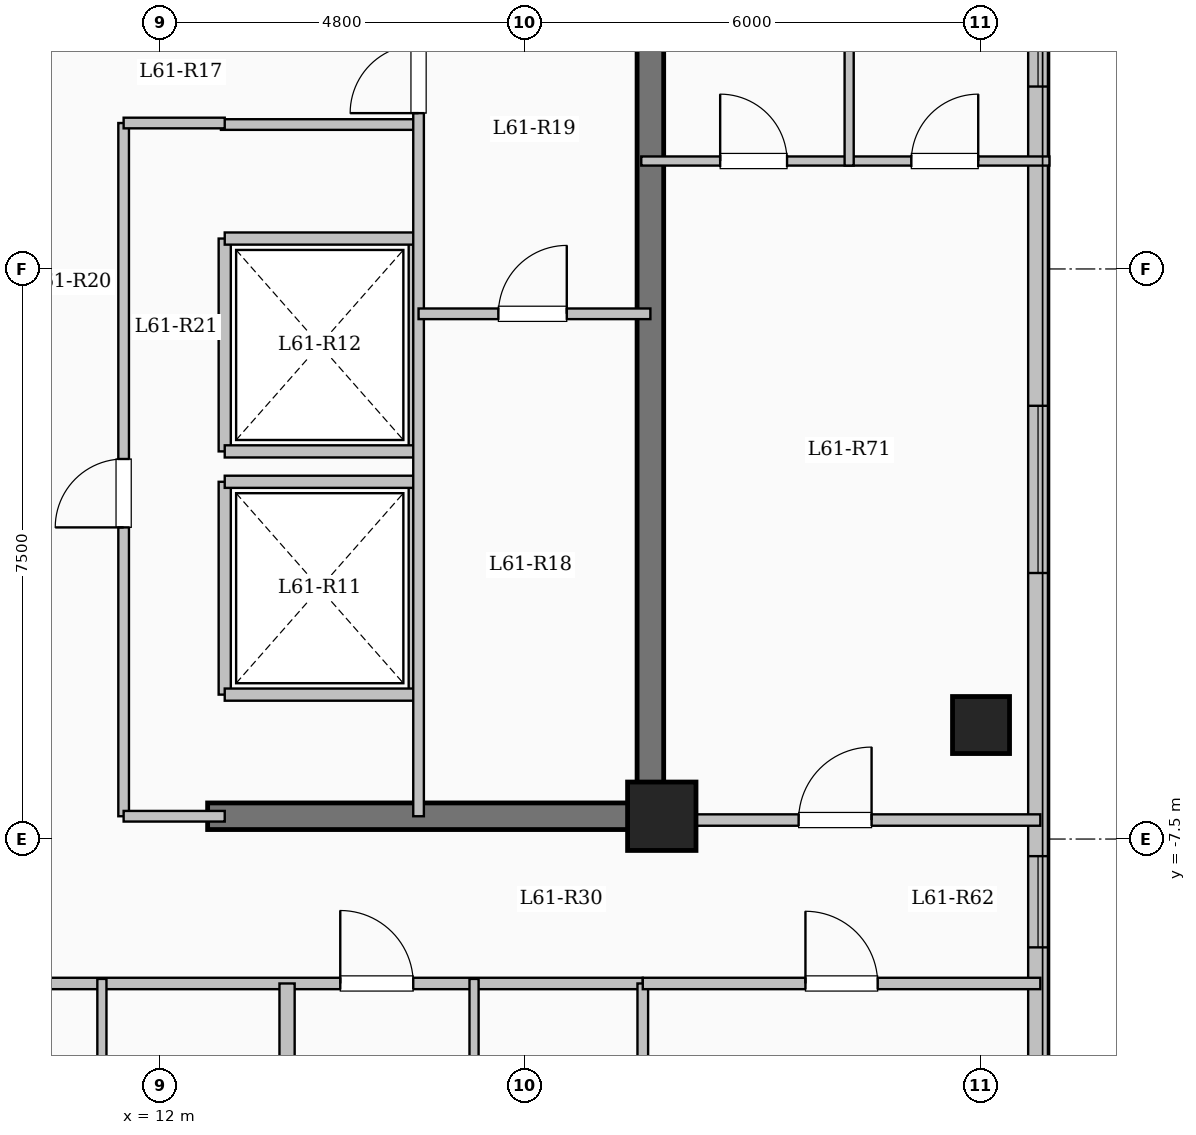
"""IFC4 building model, lengths in metres.
Left out: names, types, materials, properties, quantities, classifications, styles, units other than length and angle.
Written with IfcOpenShell. Run it as: python <this file> out.ifc"""

import sys

from ifc_helpers import new_model, si_unit, direction, frame, frame_2d, origin, origin_2d, place, context, subcontext, project, spatial, rectangle, extrude, element, fill, save


model = new_model("IFC4")
c1 = context("Model", 3, precision=1e-05, world=origin(), true_north=direction((0.0, 1.0)))
c2 = subcontext(c1, "Body", "Model", "MODEL_VIEW")
j1 = project(units=[si_unit("LENGTHUNIT", "METRE"), si_unit("PLANEANGLEUNIT", "RADIAN")], contexts=[c1])
p1 = place(None, origin())
s1 = spatial("IfcSite", under=j1, at=p1, CompositionType="ELEMENT")
p2 = place(p1, origin())
s2 = spatial("IfcBuilding", under=s1, at=p2, CompositionType="ELEMENT")
p3 = place(p2, frame((0.0, 0.0, 223.75)))
s3 = spatial("IfcBuildingStorey", under=s2, at=p3, CompositionType="ELEMENT", Elevation=223.75)
p4 = place(p3, frame((18.6, -7.2, 0.0), z_axis=(0.0, 0.0, 1.0), x_axis=(1.0, 0.0, 0.0)))
e1 = element("IfcColumn", 1, at=p4, inside=s3, PredefinedType="COLUMN", context=c2, shape_type="SweptSolid", body=[
    extrude(rectangle(XDim=0.9, YDim=0.9, at=origin_2d()), origin(), (0.0, 0.0, 1.0), 3.35),
])
p5 = place(p3, frame((22.8, -6.0, 0.0), z_axis=(0.0, 0.0, 1.0), x_axis=(1.0, 0.0, 0.0)))
e2 = element("IfcColumn", 2, at=p5, inside=s3, PredefinedType="COLUMN", context=c2, shape_type="SweptSolid", body=[
    extrude(rectangle(XDim=0.75, YDim=0.75, at=origin_2d()), origin(), (0.0, 0.0, 1.0), 3.35),
])
p6 = place(p3, frame((23.55, 17.25, 0.0), z_axis=(0.0, 0.0, 1.0), x_axis=(0.0, -1.0, 0.0)))
e3 = element("IfcWall", 3, at=p6, inside=s3, PredefinedType="SOLIDWALL", context=c2, shape_type="SweptSolid", body=[
    extrude(rectangle(XDim=34.5, YDim=0.26, at=frame_2d((17.25, 0.0))), origin(), (0.0, 0.0, 1.0), 3.05),
])
p7 = place(p6, frame((1.375, 0.0, 0.9)))
e4 = element("IfcOpeningElement", 4, at=p7, cuts=e3, PredefinedType="OPENING", context=c2, shape_type="SweptSolid", body=[
    extrude(rectangle(XDim=2.0, YDim=1.7, at=frame_2d((1.0, 0.85))), frame((0.0, 0.14, 0.0), z_axis=(0.0, -1.0, 0.0), x_axis=(1.0, 0.0, 0.0)), (0.0, 0.0, 1.0), 0.28),
])
p8 = place(p6, frame((5.125, 0.0, 0.95)))
e5 = element("IfcOpeningElement", 5, at=p8, cuts=e3, PredefinedType="OPENING", context=c2, shape_type="SweptSolid", body=[
    extrude(rectangle(XDim=1.0, YDim=1.5, at=frame_2d((0.5, 0.75))), frame((0.0, 0.14, 0.0), z_axis=(0.0, -1.0, 0.0), x_axis=(1.0, 0.0, 0.0)), (0.0, 0.0, 1.0), 0.28),
])
p9 = place(p6, frame((8.375, 0.0, 0.9)))
e6 = element("IfcOpeningElement", 6, at=p9, cuts=e3, PredefinedType="OPENING", context=c2, shape_type="SweptSolid", body=[
    extrude(rectangle(XDim=2.0, YDim=1.7, at=frame_2d((1.0, 0.85))), frame((0.0, 0.14, 0.0), z_axis=(0.0, -1.0, 0.0), x_axis=(1.0, 0.0, 0.0)), (0.0, 0.0, 1.0), 0.28),
])
p10 = place(p6, frame((13.2, 0.0, 0.9)))
e7 = element("IfcOpeningElement", 7, at=p10, cuts=e3, PredefinedType="OPENING", context=c2, shape_type="SweptSolid", body=[
    extrude(rectangle(XDim=1.65, YDim=1.6, at=frame_2d((0.825, 0.8))), frame((0.0, 0.14, 0.0), z_axis=(0.0, -1.0, 0.0), x_axis=(1.0, 0.0, 0.0)), (0.0, 0.0, 1.0), 0.28),
])
p11 = place(p6, frame((19.05, 0.0, 0.9)))
e8 = element("IfcOpeningElement", 8, at=p11, cuts=e3, PredefinedType="OPENING", context=c2, shape_type="SweptSolid", body=[
    extrude(rectangle(XDim=2.2, YDim=1.75, at=frame_2d((1.1, 0.875))), frame((0.0, 0.14, 0.0), z_axis=(0.0, -1.0, 0.0), x_axis=(1.0, 0.0, 0.0)), (0.0, 0.0, 1.0), 0.28),
])
p12 = place(p6, frame((24.975, 0.0, 0.95)))
e9 = element("IfcOpeningElement", 9, at=p12, cuts=e3, PredefinedType="OPENING", context=c2, shape_type="SweptSolid", body=[
    extrude(rectangle(XDim=1.2, YDim=1.5, at=frame_2d((0.6, 0.75))), frame((0.0, 0.14, 0.0), z_axis=(0.0, -1.0, 0.0), x_axis=(1.0, 0.0, 0.0)), (0.0, 0.0, 1.0), 0.28),
])
p13 = place(p6, frame((29.475, 0.0, 0.9)))
e10 = element("IfcOpeningElement", 10, at=p13, cuts=e3, PredefinedType="OPENING", context=c2, shape_type="SweptSolid", body=[
    extrude(rectangle(XDim=2.2, YDim=1.75, at=frame_2d((1.1, 0.875))), frame((0.0, 0.14, 0.0), z_axis=(0.0, -1.0, 0.0), x_axis=(1.0, 0.0, 0.0)), (0.0, 0.0, 1.0), 0.28),
])
for number, where, z_axis, x_axis in (
    (11, (12.85, -5.6, 0.0), (0.0, 0.0, 1.0), (0.0, 1.0, 0.0)),
    (12, (15.35, -5.6, 0.0), (0.0, 0.0, 1.0), (0.0, 1.0, 0.0)),
):
    element("IfcWall", number, at=place(p3, frame(where, z_axis=z_axis, x_axis=x_axis)), inside=s3, PredefinedType="SOLIDWALL", context=c2, shape_type="SweptSolid", body=[
        extrude(rectangle(XDim=2.8, YDim=0.16, at=frame_2d((1.4, 0.0))), origin(), (0.0, 0.0, 1.0), 3.05),
    ])
for number, where, z_axis, x_axis in (
    (13, (12.85, -5.6, 0.0), (0.0, 0.0, 1.0), (1.0, 0.0, 0.0)),
    (14, (12.85, -2.8, 0.0), (0.0, 0.0, 1.0), (1.0, 0.0, 0.0)),
):
    element("IfcWall", number, at=place(p3, frame(where, z_axis=z_axis, x_axis=x_axis)), inside=s3, PredefinedType="SOLIDWALL", context=c2, shape_type="SweptSolid", body=[
        extrude(rectangle(XDim=2.5, YDim=0.16, at=frame_2d((1.25, 0.0))), origin(), (0.0, 0.0, 1.0), 3.05),
    ])
for number, where, z_axis, x_axis in (
    (15, (12.85, -2.4, 0.0), (0.0, 0.0, 1.0), (0.0, 1.0, 0.0)),
    (16, (15.35, -2.4, 0.0), (0.0, 0.0, 1.0), (0.0, 1.0, 0.0)),
):
    element("IfcWall", number, at=place(p3, frame(where, z_axis=z_axis, x_axis=x_axis)), inside=s3, PredefinedType="SOLIDWALL", context=c2, shape_type="SweptSolid", body=[
        extrude(rectangle(XDim=2.8, YDim=0.16, at=frame_2d((1.4, 0.0))), origin(), (0.0, 0.0, 1.0), 3.05),
    ])
for number, where, z_axis, x_axis in (
    (17, (12.85, -2.4, 0.0), (0.0, 0.0, 1.0), (1.0, 0.0, 0.0)),
    (18, (12.85, 0.4, 0.0), (0.0, 0.0, 1.0), (1.0, 0.0, 0.0)),
):
    element("IfcWall", number, at=place(p3, frame(where, z_axis=z_axis, x_axis=x_axis)), inside=s3, PredefinedType="SOLIDWALL", context=c2, shape_type="SweptSolid", body=[
        extrude(rectangle(XDim=2.5, YDim=0.16, at=frame_2d((1.25, 0.0))), origin(), (0.0, 0.0, 1.0), 3.05),
    ])
p14 = place(p3, frame((18.45, -7.375, 0.0), z_axis=(0.0, 0.0, 1.0), x_axis=(0.0, 1.0, 0.0)))
e19 = element("IfcWall", 19, at=p14, inside=s3, PredefinedType="SHEAR", context=c2, shape_type="SweptSolid", body=[
    extrude(rectangle(XDim=14.05, YDim=0.35, at=frame_2d((7.025, 0.0))), origin(), (0.0, 0.0, 1.0), 3.35),
])
p15 = place(p3, frame((12.625, -7.2, 0.0), z_axis=(0.0, 0.0, 1.0), x_axis=(1.0, 0.0, 0.0)))
e20 = element("IfcWall", 20, at=p15, inside=s3, PredefinedType="SHEAR", context=c2, shape_type="SweptSolid", body=[
    extrude(rectangle(XDim=6.0, YDim=0.35, at=frame_2d((3.0, 0.0))), origin(), (0.0, 0.0, 1.0), 3.35),
])
p16 = place(p3, frame((12.8, 1.9, 0.0), z_axis=(0.0, 0.0, 1.0), x_axis=(1.0, 0.0, 0.0)))
e21 = element("IfcWall", 21, at=p16, inside=s3, PredefinedType="PARTITIONING", context=c2, shape_type="SweptSolid", body=[
    extrude(rectangle(XDim=2.6, YDim=0.14, at=frame_2d((1.3, 0.0))), origin(), (0.0, 0.0, 1.0), 3.05),
])
p17 = place(p3, frame((15.4, -7.2, 0.0), z_axis=(0.0, 0.0, 1.0), x_axis=(0.0, 1.0, 0.0)))
e22 = element("IfcWall", 22, at=p17, inside=s3, PredefinedType="PARTITIONING", context=c2, shape_type="SweptSolid", body=[
    extrude(rectangle(XDim=10.45, YDim=0.14, at=frame_2d((5.225, 0.0))), origin(), (0.0, 0.0, 1.0), 3.05),
])
p18 = place(p17, frame((9.25, 0.0, 0.0)))
e23 = element("IfcOpeningElement", 23, at=p18, cuts=e22, PredefinedType="OPENING", context=c2, shape_type="SweptSolid", body=[
    extrude(rectangle(XDim=0.9, YDim=2.08, at=frame_2d((0.45, 1.04))), frame((0.0, 0.08, 0.0), z_axis=(0.0, -1.0, 0.0), x_axis=(1.0, 0.0, 0.0)), (0.0, 0.0, 1.0), 0.16),
])
p19 = place(p3, frame((15.4, -0.59, 0.0), z_axis=(0.0, 0.0, 1.0), x_axis=(1.0, 0.0, 0.0)))
e24 = element("IfcWall", 24, at=p19, inside=s3, PredefinedType="PARTITIONING", context=c2, shape_type="SweptSolid", body=[
    extrude(rectangle(XDim=3.05, YDim=0.14, at=frame_2d((1.525, 0.0))), origin(), (0.0, 0.0, 1.0), 3.05),
])
p20 = place(p19, frame((1.05, 0.0, 0.0)))
e25 = element("IfcOpeningElement", 25, at=p20, cuts=e24, PredefinedType="OPENING", context=c2, shape_type="SweptSolid", body=[
    extrude(rectangle(XDim=0.9, YDim=2.08, at=frame_2d((0.45, 1.04))), frame((0.0, 0.08, 0.0), z_axis=(0.0, -1.0, 0.0), x_axis=(1.0, 0.0, 0.0)), (0.0, 0.0, 1.0), 0.16),
])
p21 = place(p3, frame((11.52, -7.2, 0.0), z_axis=(0.0, 0.0, 1.0), x_axis=(0.0, 1.0, 0.0)))
e26 = element("IfcWall", 26, at=p21, inside=s3, PredefinedType="PARTITIONING", context=c2, shape_type="SweptSolid", body=[
    extrude(rectangle(XDim=9.12, YDim=0.14, at=frame_2d((4.56, 0.0))), origin(), (0.0, 0.0, 1.0), 3.05),
])
p22 = place(p21, frame((3.8, 0.0, 0.0)))
e27 = element("IfcOpeningElement", 27, at=p22, cuts=e26, PredefinedType="OPENING", context=c2, shape_type="SweptSolid", body=[
    extrude(rectangle(XDim=0.9, YDim=2.08, at=frame_2d((0.45, 1.04))), frame((0.0, 0.08, 0.0), z_axis=(0.0, -1.0, 0.0), x_axis=(1.0, 0.0, 0.0)), (0.0, 0.0, 1.0), 0.16),
])
p23 = place(p3, frame((11.52, 1.92, 0.0), z_axis=(0.0, 0.0, 1.0), x_axis=(1.0, 0.0, 0.0)))
e28 = element("IfcWall", 28, at=p23, inside=s3, PredefinedType="PARTITIONING", context=c2, shape_type="SweptSolid", body=[
    extrude(rectangle(XDim=1.33, YDim=0.14, at=frame_2d((0.665, 0.0))), origin(), (0.0, 0.0, 1.0), 3.05),
])
p24 = place(p3, frame((11.52, -7.2, 0.0), z_axis=(0.0, 0.0, 1.0), x_axis=(1.0, 0.0, 0.0)))
e29 = element("IfcWall", 29, at=p24, inside=s3, PredefinedType="PARTITIONING", context=c2, shape_type="SweptSolid", body=[
    extrude(rectangle(XDim=1.33, YDim=0.14, at=frame_2d((0.665, 0.0))), origin(), (0.0, 0.0, 1.0), 2.22),
])
p25 = place(p3, frame((8.55, -9.4, 0.0), z_axis=(0.0, 0.0, 1.0), x_axis=(1.0, 0.0, 0.0)))
e30 = element("IfcWall", 30, at=p25, inside=s3, PredefinedType="PARTITIONING", context=c2, shape_type="SweptSolid", body=[
    extrude(rectangle(XDim=9.8, YDim=0.15, at=frame_2d((4.9, 0.0))), origin(), (0.0, 0.0, 1.0), 3.05),
])
p26 = place(p25, frame((0.9, 0.0, 0.0)))
e31 = element("IfcOpeningElement", 31, at=p26, cuts=e30, PredefinedType="OPENING", context=c2, shape_type="SweptSolid", body=[
    extrude(rectangle(XDim=0.96, YDim=2.15, at=frame_2d((0.48, 1.075))), frame((0.0, 0.085, 0.0), z_axis=(0.0, -1.0, 0.0), x_axis=(1.0, 0.0, 0.0)), (0.0, 0.0, 1.0), 0.17),
])
p27 = place(p25, frame((5.82, 0.0, 0.0)))
e32 = element("IfcOpeningElement", 32, at=p27, cuts=e30, PredefinedType="OPENING", context=c2, shape_type="SweptSolid", body=[
    extrude(rectangle(XDim=0.96, YDim=2.15, at=frame_2d((0.48, 1.075))), frame((0.0, 0.085, 0.0), z_axis=(0.0, -1.0, 0.0), x_axis=(1.0, 0.0, 0.0)), (0.0, 0.0, 1.0), 0.17),
])
p28 = place(p3, frame((13.67, -20.9, 0.0), z_axis=(0.0, 0.0, 1.0), x_axis=(0.0, 1.0, 0.0)))
e33 = element("IfcWall", 33, at=p28, inside=s3, PredefinedType="SOLIDWALL", context=c2, shape_type="SweptSolid", body=[
    extrude(rectangle(XDim=11.5, YDim=0.2, at=frame_2d((5.75, 0.0))), origin(), (0.0, 0.0, 1.0), 3.05),
])
p29 = place(p3, frame((11.234, -12.56, 0.0), z_axis=(0.0, 0.0, 1.0), x_axis=(0.0, 1.0, 0.0)))
e34 = element("IfcWall", 34, at=p29, inside=s3, PredefinedType="PARTITIONING", context=c2, shape_type="SweptSolid", body=[
    extrude(rectangle(XDim=3.22, YDim=0.12, at=frame_2d((1.61, 0.0))), origin(), (0.0, 0.0, 1.0), 3.05),
])
p30 = place(p29, frame((1.14, 0.0, 0.0)))
e35 = element("IfcOpeningElement", 35, at=p30, cuts=e34, PredefinedType="OPENING", context=c2, shape_type="SweptSolid", body=[
    extrude(rectangle(XDim=0.88, YDim=2.1, at=frame_2d((0.44, 1.05))), frame((0.0, 0.07, 0.0), z_axis=(0.0, -1.0, 0.0), x_axis=(1.0, 0.0, 0.0)), (0.0, 0.0, 1.0), 0.14),
])
p31 = place(p3, frame((16.13, -12.56, 0.0), z_axis=(0.0, 0.0, 1.0), x_axis=(0.0, 1.0, 0.0)))
e36 = element("IfcWall", 36, at=p31, inside=s3, PredefinedType="PARTITIONING", context=c2, shape_type="SweptSolid", body=[
    extrude(rectangle(XDim=3.22, YDim=0.12, at=frame_2d((1.61, 0.0))), origin(), (0.0, 0.0, 1.0), 3.05),
])
p32 = place(p31, frame((1.14, 0.0, 0.0)))
e37 = element("IfcOpeningElement", 37, at=p32, cuts=e36, PredefinedType="OPENING", context=c2, shape_type="SweptSolid", body=[
    extrude(rectangle(XDim=0.88, YDim=2.1, at=frame_2d((0.44, 1.05))), frame((0.0, 0.07, 0.0), z_axis=(0.0, -1.0, 0.0), x_axis=(1.0, 0.0, 0.0)), (0.0, 0.0, 1.0), 0.14),
])
p33 = place(p3, frame((18.45, -7.25, 0.0), z_axis=(0.0, 0.0, 1.0), x_axis=(1.0, 0.0, 0.0)))
e38 = element("IfcWall", 38, at=p33, inside=s3, PredefinedType="PARTITIONING", context=c2, shape_type="SweptSolid", body=[
    extrude(rectangle(XDim=5.13, YDim=0.15, at=frame_2d((2.565, 0.0))), origin(), (0.0, 0.0, 1.0), 3.05),
])
p34 = place(p33, frame((1.95, 0.0, 0.0)))
e39 = element("IfcOpeningElement", 39, at=p34, cuts=e38, PredefinedType="OPENING", context=c2, shape_type="SweptSolid", body=[
    extrude(rectangle(XDim=0.96, YDim=2.15, at=frame_2d((0.48, 1.075))), frame((0.0, 0.085, 0.0), z_axis=(0.0, -1.0, 0.0), x_axis=(1.0, 0.0, 0.0)), (0.0, 0.0, 1.0), 0.17),
])
p35 = place(p3, frame((18.35, -17.25, 0.0), z_axis=(0.0, 0.0, 1.0), x_axis=(0.0, 1.0, 0.0)))
e40 = element("IfcWall", 40, at=p35, inside=s3, PredefinedType="PARTITIONING", context=c2, shape_type="SweptSolid", body=[
    extrude(rectangle(XDim=7.85, YDim=0.14, at=frame_2d((3.925, 0.0))), origin(), (0.0, 0.0, 1.0), 3.05),
])
p36 = place(p3, frame((18.35, -9.4, 0.0), z_axis=(0.0, 0.0, 1.0), x_axis=(1.0, 0.0, 0.0)))
e41 = element("IfcWall", 41, at=p36, inside=s3, PredefinedType="PARTITIONING", context=c2, shape_type="SweptSolid", body=[
    extrude(rectangle(XDim=5.23, YDim=0.15, at=frame_2d((2.615, 0.0))), origin(), (0.0, 0.0, 1.0), 3.05),
])
p37 = place(p36, frame((2.14, 0.0, 0.0)))
e42 = element("IfcOpeningElement", 42, at=p37, cuts=e41, PredefinedType="OPENING", context=c2, shape_type="SweptSolid", body=[
    extrude(rectangle(XDim=0.95, YDim=2.15, at=frame_2d((0.475, 1.075))), frame((0.0, 0.085, 0.0), z_axis=(0.0, -1.0, 0.0), x_axis=(1.0, 0.0, 0.0)), (0.0, 0.0, 1.0), 0.17),
])
p38 = place(p3, frame((18.33, 1.42, 0.0), z_axis=(0.0, 0.0, 1.0), x_axis=(1.0, 0.0, 0.0)))
e43 = element("IfcWall", 43, at=p38, inside=s3, PredefinedType="PARTITIONING", context=c2, shape_type="SweptSolid", body=[
    extrude(rectangle(XDim=5.37, YDim=0.12, at=frame_2d((2.685, 0.0))), origin(), (0.0, 0.0, 1.0), 3.05),
])
p39 = place(p38, frame((1.038, 0.0, 0.0)))
e44 = element("IfcOpeningElement", 44, at=p39, cuts=e43, PredefinedType="OPENING", context=c2, shape_type="SweptSolid", body=[
    extrude(rectangle(XDim=0.88, YDim=2.1, at=frame_2d((0.44, 1.05))), frame((0.0, 0.07, 0.0), z_axis=(0.0, -1.0, 0.0), x_axis=(1.0, 0.0, 0.0)), (0.0, 0.0, 1.0), 0.14),
])
p40 = place(p38, frame((3.553, 0.0, 0.0)))
e45 = element("IfcOpeningElement", 45, at=p40, cuts=e43, PredefinedType="OPENING", context=c2, shape_type="SweptSolid", body=[
    extrude(rectangle(XDim=0.88, YDim=2.1, at=frame_2d((0.44, 1.05))), frame((0.0, 0.07, 0.0), z_axis=(0.0, -1.0, 0.0), x_axis=(1.0, 0.0, 0.0)), (0.0, 0.0, 1.0), 0.14),
])
p41 = place(p3, frame((21.065, 1.36, 0.0), z_axis=(0.0, 0.0, 1.0), x_axis=(0.0, 1.0, 0.0)))
e46 = element("IfcWall", 46, at=p41, inside=s3, PredefinedType="PARTITIONING", context=c2, shape_type="SweptSolid", body=[
    extrude(rectangle(XDim=3.58, YDim=0.12, at=frame_2d((1.79, 0.0))), origin(), (0.0, 0.0, 1.0), 3.05),
])
p42 = place(p10, origin())
e47 = element("IfcWindow", 47, at=p42, inside=s3, PartitioningType="SINGLE_PANEL", PredefinedType="WINDOW", context=c2, shape_type="SweptSolid", body=[
    extrude(rectangle(XDim=1.65, YDim=1.6, at=frame_2d((0.825, 0.8))), frame((0.0, 0.03, 0.0), z_axis=(0.0, -1.0, 0.0), x_axis=(1.0, 0.0, 0.0)), (0.0, 0.0, 1.0), 0.06),
])
fill(e7, e47)
p43 = place(p11, origin())
e48 = element("IfcWindow", 48, at=p43, inside=s3, PartitioningType="SINGLE_PANEL", PredefinedType="WINDOW", context=c2, shape_type="SweptSolid", body=[
    extrude(rectangle(XDim=2.2, YDim=1.75, at=frame_2d((1.1, 0.875))), frame((0.0, 0.03, 0.0), z_axis=(0.0, -1.0, 0.0), x_axis=(1.0, 0.0, 0.0)), (0.0, 0.0, 1.0), 0.06),
])
fill(e8, e48)
p44 = place(p12, origin())
e49 = element("IfcWindow", 49, at=p44, inside=s3, PartitioningType="SINGLE_PANEL", PredefinedType="WINDOW", context=c2, shape_type="SweptSolid", body=[
    extrude(rectangle(XDim=1.2, YDim=1.5, at=frame_2d((0.6, 0.75))), frame((0.0, 0.03, 0.0), z_axis=(0.0, -1.0, 0.0), x_axis=(1.0, 0.0, 0.0)), (0.0, 0.0, 1.0), 0.06),
])
fill(e9, e49)
p45 = place(p18, origin())
e50 = element("IfcDoor", 50, at=p45, inside=s3, OperationType="SINGLE_SWING_LEFT", PredefinedType="DOOR", context=c2, shape_type="SweptSolid", body=[
    extrude(rectangle(XDim=0.9, YDim=2.08, at=frame_2d((0.45, 1.04))), frame((0.0, 0.025, 0.0), z_axis=(0.0, -1.0, 0.0), x_axis=(1.0, 0.0, 0.0)), (0.0, 0.0, 1.0), 0.05),
])
fill(e23, e50)
p46 = place(p20, origin())
e51 = element("IfcDoor", 51, at=p46, inside=s3, OperationType="SINGLE_SWING_RIGHT", PredefinedType="DOOR", context=c2, shape_type="SweptSolid", body=[
    extrude(rectangle(XDim=0.9, YDim=2.08, at=frame_2d((0.45, 1.04))), frame((0.0, 0.025, 0.0), z_axis=(0.0, -1.0, 0.0), x_axis=(1.0, 0.0, 0.0)), (0.0, 0.0, 1.0), 0.05),
])
fill(e25, e51)
p47 = place(p22, origin())
e52 = element("IfcDoor", 52, at=p47, inside=s3, OperationType="SINGLE_SWING_LEFT", PredefinedType="DOOR", context=c2, shape_type="SweptSolid", body=[
    extrude(rectangle(XDim=0.9, YDim=2.08, at=frame_2d((0.45, 1.04))), frame((0.0, 0.025, 0.0), z_axis=(0.0, -1.0, 0.0), x_axis=(1.0, 0.0, 0.0)), (0.0, 0.0, 1.0), 0.05),
])
fill(e27, e52)
p48 = place(p27, origin())
e53 = element("IfcDoor", 53, at=p48, inside=s3, OperationType="SINGLE_SWING_LEFT", PredefinedType="DOOR", context=c2, shape_type="SweptSolid", body=[
    extrude(rectangle(XDim=0.96, YDim=2.15, at=frame_2d((0.48, 1.075))), frame((0.0, 0.025, 0.0), z_axis=(0.0, -1.0, 0.0), x_axis=(1.0, 0.0, 0.0)), (0.0, 0.0, 1.0), 0.05),
])
fill(e32, e53)
p49 = place(p37, origin())
e54 = element("IfcDoor", 54, at=p49, inside=s3, OperationType="SINGLE_SWING_LEFT", PredefinedType="DOOR", context=c2, shape_type="SweptSolid", body=[
    extrude(rectangle(XDim=0.95, YDim=2.15, at=frame_2d((0.475, 1.075))), frame((0.0, 0.025, 0.0), z_axis=(0.0, -1.0, 0.0), x_axis=(1.0, 0.0, 0.0)), (0.0, 0.0, 1.0), 0.05),
])
fill(e42, e54)
p50 = place(p34, origin())
e55 = element("IfcDoor", 55, at=p50, inside=s3, OperationType="SINGLE_SWING_RIGHT", PredefinedType="DOOR", context=c2, shape_type="SweptSolid", body=[
    extrude(rectangle(XDim=0.96, YDim=2.15, at=frame_2d((0.48, 1.075))), frame((0.0, 0.025, 0.0), z_axis=(0.0, -1.0, 0.0), x_axis=(1.0, 0.0, 0.0)), (0.0, 0.0, 1.0), 0.05),
])
fill(e39, e55)
p51 = place(p39, origin())
e56 = element("IfcDoor", 56, at=p51, inside=s3, OperationType="SINGLE_SWING_LEFT", PredefinedType="DOOR", context=c2, shape_type="SweptSolid", body=[
    extrude(rectangle(XDim=0.88, YDim=2.1, at=frame_2d((0.44, 1.05))), frame((0.0, 0.025, 0.0), z_axis=(0.0, -1.0, 0.0), x_axis=(1.0, 0.0, 0.0)), (0.0, 0.0, 1.0), 0.05),
])
fill(e44, e56)
p52 = place(p40, origin())
e57 = element("IfcDoor", 57, at=p52, inside=s3, OperationType="SINGLE_SWING_RIGHT", PredefinedType="DOOR", context=c2, shape_type="SweptSolid", body=[
    extrude(rectangle(XDim=0.88, YDim=2.1, at=frame_2d((0.44, 1.05))), frame((0.0, 0.025, 0.0), z_axis=(0.0, -1.0, 0.0), x_axis=(1.0, 0.0, 0.0)), (0.0, 0.0, 1.0), 0.05),
])
fill(e45, e57)
save(model, sys.argv[1])
